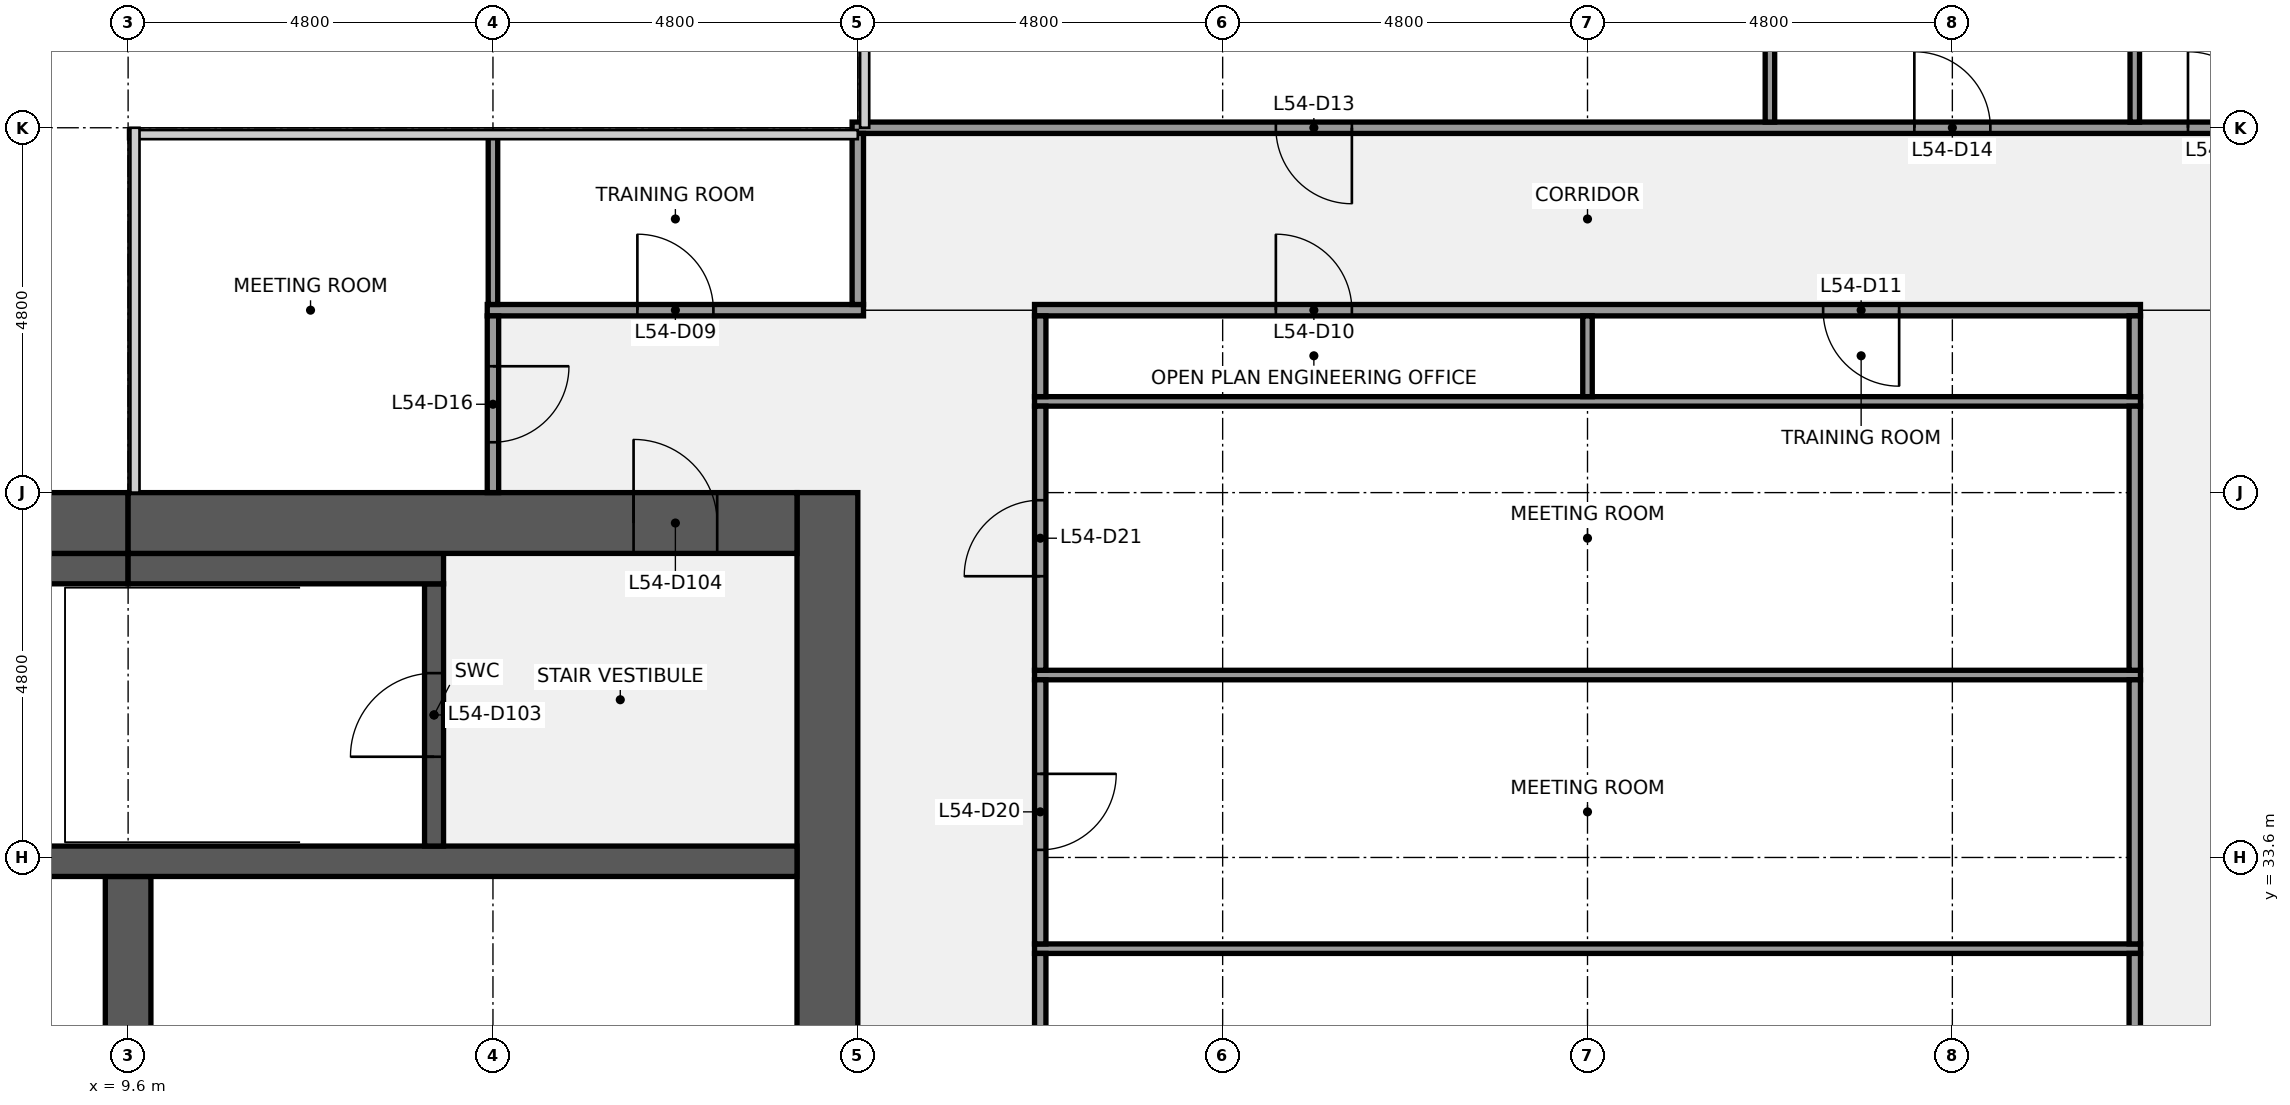
"""IFC4 building model, lengths in metres.
Left out: names, types, materials, properties, quantities, classifications, styles, units other than length and angle.
Written with IfcOpenShell. Run it as: python <this file> out.ifc"""

import sys

from ifc_helpers import new_model, si_unit, direction, frame, frame_2d, origin, place, context, subcontext, project, spatial, rectangle, extrude, element, fill, save


model = new_model("IFC4")
c1 = context("Model", 3, precision=1e-05, world=origin(), true_north=direction((0.0, 1.0)))
c2 = subcontext(c1, "Body", "Model", "MODEL_VIEW")
j1 = project(units=[si_unit("LENGTHUNIT", "METRE"), si_unit("PLANEANGLEUNIT", "RADIAN")], contexts=[c1])
p1 = place(None, origin())
s1 = spatial("IfcSite", under=j1, at=p1, CompositionType="ELEMENT")
p2 = place(p1, origin())
s2 = spatial("IfcBuilding", under=s1, at=p2, CompositionType="ELEMENT")
p3 = place(p2, frame((0.0, 0.0, 245.2)))
s3 = spatial("IfcBuildingStorey", under=s2, at=p3, CompositionType="ELEMENT", Elevation=245.2)
p4 = place(p3, frame((18.8, 38.4, 0.0), z_axis=(0.0, 0.0, 1.0), x_axis=(0.0, -1.0, 0.0)))
e1 = element("IfcWall", 1, at=p4, inside=s3, PredefinedType="SHEAR", context=c2, shape_type="SweptSolid", body=[
    extrude(rectangle(XDim=28.8, YDim=0.8, at=frame_2d((14.4, 0.0))), origin(), (0.0, 0.0, 1.0), 3.84),
])
p5 = place(p4, frame((18.3, 0.0, 0.0)))
e2 = element("IfcOpeningElement", 2, at=p5, cuts=e1, PredefinedType="OPENING", context=c2, shape_type="SweptSolid", body=[
    extrude(rectangle(XDim=1.8, YDim=2.1, at=frame_2d((0.9, 1.05))), frame((0.0, 0.41, 0.0), z_axis=(0.0, -1.0, 0.0), x_axis=(1.0, 0.0, 0.0)), (0.0, 0.0, 1.0), 0.82),
])
p6 = place(p4, frame((8.7, 0.0, 0.0)))
e3 = element("IfcOpeningElement", 3, at=p6, cuts=e1, PredefinedType="OPENING", context=c2, shape_type="SweptSolid", body=[
    extrude(rectangle(XDim=1.8, YDim=2.1, at=frame_2d((0.9, 1.05))), frame((0.0, 0.41, 0.0), z_axis=(0.0, -1.0, 0.0), x_axis=(1.0, 0.0, 0.0)), (0.0, 0.0, 1.0), 0.82),
])
p7 = place(p3, frame((9.6, 30.75, 0.0), z_axis=(0.0, 0.0, 1.0), x_axis=(0.0, 1.0, 0.0)))
e4 = element("IfcWall", 4, at=p7, inside=s3, PredefinedType="SHEAR", context=c2, shape_type="SweptSolid", body=[
    extrude(rectangle(XDim=2.6, YDim=0.6, at=frame_2d((1.3, 0.0))), origin(), (0.0, 0.0, 1.0), 3.84),
])
p8 = place(p3, frame((0.8, 33.55, 0.0), z_axis=(0.0, 0.0, 1.0), x_axis=(1.0, 0.0, 0.0)))
e5 = element("IfcWall", 5, at=p8, inside=s3, PredefinedType="SHEAR", context=c2, shape_type="SweptSolid", body=[
    extrude(rectangle(XDim=17.6, YDim=0.4, at=frame_2d((8.8, 0.0))), origin(), (0.0, 0.0, 1.0), 3.84),
])
p9 = place(p3, frame((13.625, 33.75, 0.0), z_axis=(0.0, 0.0, 1.0), x_axis=(0.0, 1.0, 0.0)))
e6 = element("IfcWall", 6, at=p9, inside=s3, PredefinedType="SHEAR", context=c2, shape_type="SweptSolid", body=[
    extrude(rectangle(XDim=3.45, YDim=0.25, at=frame_2d((1.725, 0.0))), origin(), (0.0, 0.0, 1.0), 3.84),
])
p10 = place(p9, frame((1.175, 0.0, 0.0)))
e7 = element("IfcOpeningElement", 7, at=p10, cuts=e6, PredefinedType="OPENING", context=c2, shape_type="SweptSolid", body=[
    extrude(rectangle(XDim=1.1, YDim=2.1, at=frame_2d((0.55, 1.05))), frame((0.0, 0.135, 0.0), z_axis=(0.0, -1.0, 0.0), x_axis=(1.0, 0.0, 0.0)), (0.0, 0.0, 1.0), 0.27),
])
p11 = place(p3, frame((6.25, 37.4, 0.0), z_axis=(0.0, 0.0, 1.0), x_axis=(1.0, 0.0, 0.0)))
e8 = element("IfcWall", 8, at=p11, inside=s3, PredefinedType="SHEAR", context=c2, shape_type="SweptSolid", body=[
    extrude(rectangle(XDim=3.35, YDim=0.4, at=frame_2d((1.675, 0.0))), origin(), (0.0, 0.0, 1.0), 3.84),
])
p12 = place(p3, frame((9.6, 37.4, 0.0), z_axis=(0.0, 0.0, 1.0), x_axis=(1.0, 0.0, 0.0)))
e9 = element("IfcWall", 9, at=p12, inside=s3, PredefinedType="SHEAR", context=c2, shape_type="SweptSolid", body=[
    extrude(rectangle(XDim=4.15, YDim=0.4, at=frame_2d((2.075, 0.0))), origin(), (0.0, 0.0, 1.0), 3.84),
])
p13 = place(p3, frame((0.8, 38.0, 0.0), z_axis=(0.0, 0.0, 1.0), x_axis=(1.0, 0.0, 0.0)))
e10 = element("IfcWall", 10, at=p13, inside=s3, PredefinedType="SHEAR", context=c2, shape_type="SweptSolid", body=[
    extrude(rectangle(XDim=8.8, YDim=0.8, at=frame_2d((4.4, 0.0))), origin(), (0.0, 0.0, 1.0), 3.84),
])
p14 = place(p13, frame((5.5, 0.0, 0.9)))
e11 = element("IfcOpeningElement", 11, at=p14, cuts=e10, PredefinedType="OPENING", context=c2, shape_type="SweptSolid", body=[
    extrude(rectangle(XDim=1.8, YDim=1.5, at=frame_2d((0.9, 0.75))), frame((0.0, 0.41, 0.0), z_axis=(0.0, -1.0, 0.0), x_axis=(1.0, 0.0, 0.0)), (0.0, 0.0, 1.0), 0.82),
])
p15 = place(p3, frame((9.6, 38.0, 0.0), z_axis=(0.0, 0.0, 1.0), x_axis=(1.0, 0.0, 0.0)))
e12 = element("IfcWall", 12, at=p15, inside=s3, PredefinedType="SHEAR", context=c2, shape_type="SweptSolid", body=[
    extrude(rectangle(XDim=8.8, YDim=0.8, at=frame_2d((4.4, 0.0))), origin(), (0.0, 0.0, 1.0), 3.84),
])
p16 = place(p15, frame((6.65, 0.0, 0.0)))
e13 = element("IfcOpeningElement", 13, at=p16, cuts=e12, PredefinedType="OPENING", context=c2, shape_type="SweptSolid", body=[
    extrude(rectangle(XDim=1.1, YDim=2.1, at=frame_2d((0.55, 1.05))), frame((0.0, 0.41, 0.0), z_axis=(0.0, -1.0, 0.0), x_axis=(1.0, 0.0, 0.0)), (0.0, 0.0, 1.0), 0.82),
])
for number, where, z_axis, x_axis in (
    (14, (21.525, 32.4, 0.0), (0.0, 0.0, 1.0), (1.0, 0.0, 0.0)),
    (15, (21.525, 36.0, 0.0), (0.0, 0.0, 1.0), (1.0, 0.0, 0.0)),
    (16, (21.525, 39.6, 0.0), (0.0, 0.0, 1.0), (1.0, 0.0, 0.0)),
):
    element("IfcWall", number, at=place(p3, frame(where, z_axis=z_axis, x_axis=x_axis)), inside=s3, PredefinedType="PARTITIONING", context=c2, shape_type="SweptSolid", body=[
        extrude(rectangle(XDim=14.55, YDim=0.125, at=frame_2d((7.275, 0.0))), origin(), (0.0, 0.0, 1.0), 2.87),
    ])
p17 = place(p3, frame((14.325, 40.8, 0.0), z_axis=(0.0, 0.0, 1.0), x_axis=(1.0, 0.0, 0.0)))
e17 = element("IfcWall", 17, at=p17, inside=s3, PredefinedType="PARTITIONING", context=c2, shape_type="SweptSolid", body=[
    extrude(rectangle(XDim=4.95, YDim=0.15, at=frame_2d((2.475, 0.0))), origin(), (0.0, 0.0, 1.0), 2.87),
])
p18 = place(p17, frame((1.975, 0.0, 0.0)))
e18 = element("IfcOpeningElement", 18, at=p18, cuts=e17, PredefinedType="OPENING", context=c2, shape_type="SweptSolid", body=[
    extrude(rectangle(XDim=1.0, YDim=2.1, at=frame_2d((0.5, 1.05))), frame((0.0, 0.085, 0.0), z_axis=(0.0, -1.0, 0.0), x_axis=(1.0, 0.0, 0.0)), (0.0, 0.0, 1.0), 0.17),
])
p19 = place(p3, frame((21.525, 40.8, 0.0), z_axis=(0.0, 0.0, 1.0), x_axis=(1.0, 0.0, 0.0)))
e19 = element("IfcWall", 19, at=p19, inside=s3, PredefinedType="PARTITIONING", context=c2, shape_type="SweptSolid", body=[
    extrude(rectangle(XDim=14.55, YDim=0.15, at=frame_2d((7.275, 0.0))), origin(), (0.0, 0.0, 1.0), 2.87),
])
p20 = place(p19, frame((3.175, 0.0, 0.0)))
e20 = element("IfcOpeningElement", 20, at=p20, cuts=e19, PredefinedType="OPENING", context=c2, shape_type="SweptSolid", body=[
    extrude(rectangle(XDim=1.0, YDim=2.1, at=frame_2d((0.5, 1.05))), frame((0.0, 0.085, 0.0), z_axis=(0.0, -1.0, 0.0), x_axis=(1.0, 0.0, 0.0)), (0.0, 0.0, 1.0), 0.17),
])
p21 = place(p19, frame((10.375, 0.0, 0.0)))
e21 = element("IfcOpeningElement", 21, at=p21, cuts=e19, PredefinedType="OPENING", context=c2, shape_type="SweptSolid", body=[
    extrude(rectangle(XDim=1.0, YDim=2.1, at=frame_2d((0.5, 1.05))), frame((0.0, 0.085, 0.0), z_axis=(0.0, -1.0, 0.0), x_axis=(1.0, 0.0, 0.0)), (0.0, 0.0, 1.0), 0.17),
])
p22 = place(p3, frame((19.125, 43.2, 0.0), z_axis=(0.0, 0.0, 1.0), x_axis=(1.0, 0.0, 0.0)))
e22 = element("IfcWall", 22, at=p22, inside=s3, PredefinedType="PARTITIONING", context=c2, shape_type="SweptSolid", body=[
    extrude(rectangle(XDim=19.35, YDim=0.15, at=frame_2d((9.675, 0.0))), origin(), (0.0, 0.0, 1.0), 2.87),
])
p23 = place(p22, frame((5.575, 0.0, 0.0)))
e23 = element("IfcOpeningElement", 23, at=p23, cuts=e22, PredefinedType="OPENING", context=c2, shape_type="SweptSolid", body=[
    extrude(rectangle(XDim=1.0, YDim=2.1, at=frame_2d((0.5, 1.05))), frame((0.0, 0.085, 0.0), z_axis=(0.0, -1.0, 0.0), x_axis=(1.0, 0.0, 0.0)), (0.0, 0.0, 1.0), 0.17),
])
p24 = place(p22, frame((13.975, 0.0, 0.0)))
e24 = element("IfcOpeningElement", 24, at=p24, cuts=e22, PredefinedType="OPENING", context=c2, shape_type="SweptSolid", body=[
    extrude(rectangle(XDim=1.0, YDim=2.1, at=frame_2d((0.5, 1.05))), frame((0.0, 0.085, 0.0), z_axis=(0.0, -1.0, 0.0), x_axis=(1.0, 0.0, 0.0)), (0.0, 0.0, 1.0), 0.17),
])
p25 = place(p22, frame((17.575, 0.0, 0.0)))
e25 = element("IfcOpeningElement", 25, at=p25, cuts=e22, PredefinedType="OPENING", context=c2, shape_type="SweptSolid", body=[
    extrude(rectangle(XDim=1.0, YDim=2.1, at=frame_2d((0.5, 1.05))), frame((0.0, 0.085, 0.0), z_axis=(0.0, -1.0, 0.0), x_axis=(1.0, 0.0, 0.0)), (0.0, 0.0, 1.0), 0.17),
])
p26 = place(p3, frame((14.4, 40.875, 0.0), z_axis=(0.0, 0.0, 1.0), x_axis=(0.0, 1.0, 0.0)))
e26 = element("IfcWall", 26, at=p26, inside=s3, PredefinedType="PARTITIONING", context=c2, shape_type="SweptSolid", body=[
    extrude(rectangle(XDim=2.225, YDim=0.125, at=frame_2d((1.113, 0.0))), origin(), (0.0, 0.0, 1.0), 2.87),
])
p27 = place(p3, frame((14.4, 38.4, 0.0), z_axis=(0.0, 0.0, 1.0), x_axis=(0.0, 1.0, 0.0)))
e27 = element("IfcWall", 27, at=p27, inside=s3, PredefinedType="PARTITIONING", context=c2, shape_type="SweptSolid", body=[
    extrude(rectangle(XDim=2.325, YDim=0.15, at=frame_2d((1.163, 0.0))), origin(), (0.0, 0.0, 1.0), 2.87),
])
p28 = place(p27, frame((0.663, 0.0, 0.0)))
e28 = element("IfcOpeningElement", 28, at=p28, cuts=e27, PredefinedType="OPENING", context=c2, shape_type="SweptSolid", body=[
    extrude(rectangle(XDim=1.0, YDim=2.1, at=frame_2d((0.5, 1.05))), frame((0.0, 0.085, 0.0), z_axis=(0.0, -1.0, 0.0), x_axis=(1.0, 0.0, 0.0)), (0.0, 0.0, 1.0), 0.17),
])
p29 = place(p3, frame((19.2, 40.875, 0.0), z_axis=(0.0, 0.0, 1.0), x_axis=(0.0, 1.0, 0.0)))
e29 = element("IfcWall", 29, at=p29, inside=s3, PredefinedType="PARTITIONING", context=c2, shape_type="SweptSolid", body=[
    extrude(rectangle(XDim=2.25, YDim=0.15, at=frame_2d((1.125, 0.0))), origin(), (0.0, 0.0, 1.0), 2.87),
])
p30 = place(p3, frame((21.6, 22.863, 0.0), z_axis=(0.0, 0.0, 1.0), x_axis=(0.0, 1.0, 0.0)))
e30 = element("IfcWall", 30, at=p30, inside=s3, PredefinedType="PARTITIONING", context=c2, shape_type="SweptSolid", body=[
    extrude(rectangle(XDim=9.475, YDim=0.15, at=frame_2d((4.737, 0.0))), origin(), (0.0, 0.0, 1.0), 2.87),
])
p31 = place(p30, frame((4.238, 0.0, 0.0)))
e31 = element("IfcOpeningElement", 31, at=p31, cuts=e30, PredefinedType="OPENING", context=c2, shape_type="SweptSolid", body=[
    extrude(rectangle(XDim=1.0, YDim=2.1, at=frame_2d((0.5, 1.05))), frame((0.0, 0.085, 0.0), z_axis=(0.0, -1.0, 0.0), x_axis=(1.0, 0.0, 0.0)), (0.0, 0.0, 1.0), 0.17),
])
p32 = place(p3, frame((21.6, 32.462, 0.0), z_axis=(0.0, 0.0, 1.0), x_axis=(0.0, 1.0, 0.0)))
e32 = element("IfcWall", 32, at=p32, inside=s3, PredefinedType="PARTITIONING", context=c2, shape_type="SweptSolid", body=[
    extrude(rectangle(XDim=3.475, YDim=0.15, at=frame_2d((1.738, 0.0))), origin(), (0.0, 0.0, 1.0), 2.87),
])
p33 = place(p32, frame((1.238, 0.0, 0.0)))
e33 = element("IfcOpeningElement", 33, at=p33, cuts=e32, PredefinedType="OPENING", context=c2, shape_type="SweptSolid", body=[
    extrude(rectangle(XDim=1.0, YDim=2.1, at=frame_2d((0.5, 1.05))), frame((0.0, 0.085, 0.0), z_axis=(0.0, -1.0, 0.0), x_axis=(1.0, 0.0, 0.0)), (0.0, 0.0, 1.0), 0.17),
])
p34 = place(p3, frame((21.6, 36.062, 0.0), z_axis=(0.0, 0.0, 1.0), x_axis=(0.0, 1.0, 0.0)))
e34 = element("IfcWall", 34, at=p34, inside=s3, PredefinedType="PARTITIONING", context=c2, shape_type="SweptSolid", body=[
    extrude(rectangle(XDim=3.475, YDim=0.15, at=frame_2d((1.738, 0.0))), origin(), (0.0, 0.0, 1.0), 2.87),
])
p35 = place(p34, frame((1.238, 0.0, 0.0)))
e35 = element("IfcOpeningElement", 35, at=p35, cuts=e34, PredefinedType="OPENING", context=c2, shape_type="SweptSolid", body=[
    extrude(rectangle(XDim=1.0, YDim=2.1, at=frame_2d((0.5, 1.05))), frame((0.0, 0.085, 0.0), z_axis=(0.0, -1.0, 0.0), x_axis=(1.0, 0.0, 0.0)), (0.0, 0.0, 1.0), 0.17),
])
p36 = place(p3, frame((21.6, 39.663, 0.0), z_axis=(0.0, 0.0, 1.0), x_axis=(0.0, 1.0, 0.0)))
e36 = element("IfcWall", 36, at=p36, inside=s3, PredefinedType="PARTITIONING", context=c2, shape_type="SweptSolid", body=[
    extrude(rectangle(XDim=1.062, YDim=0.15, at=frame_2d((0.531, 0.0))), origin(), (0.0, 0.0, 1.0), 2.87),
])
p37 = place(p3, frame((28.8, 39.663, 0.0), z_axis=(0.0, 0.0, 1.0), x_axis=(0.0, 1.0, 0.0)))
e37 = element("IfcWall", 37, at=p37, inside=s3, PredefinedType="PARTITIONING", context=c2, shape_type="SweptSolid", body=[
    extrude(rectangle(XDim=1.062, YDim=0.125, at=frame_2d((0.531, 0.0))), origin(), (0.0, 0.0, 1.0), 2.87),
])
for number, where, z_axis, x_axis in (
    (38, (31.2, 43.275, 0.0), (0.0, 0.0, 1.0), (0.0, 1.0, 0.0)),
    (39, (36.0, 43.275, 0.0), (0.0, 0.0, 1.0), (0.0, 1.0, 0.0)),
):
    element("IfcWall", number, at=place(p3, frame(where, z_axis=z_axis, x_axis=x_axis)), inside=s3, PredefinedType="PARTITIONING", context=c2, shape_type="SweptSolid", body=[
        extrude(rectangle(XDim=4.625, YDim=0.125, at=frame_2d((2.312, 0.0))), origin(), (0.0, 0.0, 1.0), 2.87),
    ])
p38 = place(p3, frame((36.0, 22.863, 0.0), z_axis=(0.0, 0.0, 1.0), x_axis=(0.0, 1.0, 0.0)))
e40 = element("IfcWall", 40, at=p38, inside=s3, PredefinedType="PARTITIONING", context=c2, shape_type="SweptSolid", body=[
    extrude(rectangle(XDim=9.475, YDim=0.15, at=frame_2d((4.737, 0.0))), origin(), (0.0, 0.0, 1.0), 2.87),
])
for number, where, z_axis, x_axis in (
    (41, (36.0, 32.462, 0.0), (0.0, 0.0, 1.0), (0.0, 1.0, 0.0)),
    (42, (36.0, 36.062, 0.0), (0.0, 0.0, 1.0), (0.0, 1.0, 0.0)),
):
    element("IfcWall", number, at=place(p3, frame(where, z_axis=z_axis, x_axis=x_axis)), inside=s3, PredefinedType="PARTITIONING", context=c2, shape_type="SweptSolid", body=[
        extrude(rectangle(XDim=3.475, YDim=0.15, at=frame_2d((1.738, 0.0))), origin(), (0.0, 0.0, 1.0), 2.87),
    ])
p39 = place(p3, frame((36.0, 39.663, 0.0), z_axis=(0.0, 0.0, 1.0), x_axis=(0.0, 1.0, 0.0)))
e43 = element("IfcWall", 43, at=p39, inside=s3, PredefinedType="PARTITIONING", context=c2, shape_type="SweptSolid", body=[
    extrude(rectangle(XDim=1.062, YDim=0.15, at=frame_2d((0.531, 0.0))), origin(), (0.0, 0.0, 1.0), 2.87),
])
p40 = place(p10, origin())
e44 = element("IfcDoor", 44, at=p40, inside=s3, OperationType="SINGLE_SWING_LEFT", PredefinedType="DOOR", context=c2, shape_type="SweptSolid", body=[
    extrude(rectangle(XDim=1.1, YDim=2.1, at=frame_2d((0.55, 1.05))), frame((0.0, 0.025, 0.0), z_axis=(0.0, -1.0, 0.0), x_axis=(1.0, 0.0, 0.0)), (0.0, 0.0, 1.0), 0.05),
])
fill(e7, e44)
p41 = place(p16, origin())
e45 = element("IfcDoor", 45, at=p41, inside=s3, OperationType="SINGLE_SWING_LEFT", PredefinedType="DOOR", context=c2, shape_type="SweptSolid", body=[
    extrude(rectangle(XDim=1.1, YDim=2.1, at=frame_2d((0.55, 1.05))), frame((0.0, 0.025, 0.0), z_axis=(0.0, -1.0, 0.0), x_axis=(1.0, 0.0, 0.0)), (0.0, 0.0, 1.0), 0.05),
])
fill(e13, e45)
p42 = place(p18, origin())
e46 = element("IfcDoor", 46, at=p42, inside=s3, OperationType="SINGLE_SWING_LEFT", PredefinedType="DOOR", context=c2, shape_type="SweptSolid", body=[
    extrude(rectangle(XDim=1.0, YDim=2.1, at=frame_2d((0.5, 1.05))), frame((0.0, 0.025, 0.0), z_axis=(0.0, -1.0, 0.0), x_axis=(1.0, 0.0, 0.0)), (0.0, 0.0, 1.0), 0.05),
])
fill(e18, e46)
p43 = place(p20, origin())
e47 = element("IfcDoor", 47, at=p43, inside=s3, OperationType="SINGLE_SWING_LEFT", PredefinedType="DOOR", context=c2, shape_type="SweptSolid", body=[
    extrude(rectangle(XDim=1.0, YDim=2.1, at=frame_2d((0.5, 1.05))), frame((0.0, 0.025, 0.0), z_axis=(0.0, -1.0, 0.0), x_axis=(1.0, 0.0, 0.0)), (0.0, 0.0, 1.0), 0.05),
])
fill(e20, e47)
p44 = place(p21, origin())
e48 = element("IfcDoor", 48, at=p44, inside=s3, OperationType="SINGLE_SWING_RIGHT", PredefinedType="DOOR", context=c2, shape_type="SweptSolid", body=[
    extrude(rectangle(XDim=1.0, YDim=2.1, at=frame_2d((0.5, 1.05))), frame((0.0, 0.025, 0.0), z_axis=(0.0, -1.0, 0.0), x_axis=(1.0, 0.0, 0.0)), (0.0, 0.0, 1.0), 0.05),
])
fill(e21, e48)
p45 = place(p23, origin())
e49 = element("IfcDoor", 49, at=p45, inside=s3, OperationType="SINGLE_SWING_RIGHT", PredefinedType="DOOR", context=c2, shape_type="SweptSolid", body=[
    extrude(rectangle(XDim=1.0, YDim=2.1, at=frame_2d((0.5, 1.05))), frame((0.0, 0.025, 0.0), z_axis=(0.0, -1.0, 0.0), x_axis=(1.0, 0.0, 0.0)), (0.0, 0.0, 1.0), 0.05),
])
fill(e23, e49)
p46 = place(p24, origin())
e50 = element("IfcDoor", 50, at=p46, inside=s3, OperationType="SINGLE_SWING_LEFT", PredefinedType="DOOR", context=c2, shape_type="SweptSolid", body=[
    extrude(rectangle(XDim=1.0, YDim=2.1, at=frame_2d((0.5, 1.05))), frame((0.0, 0.025, 0.0), z_axis=(0.0, -1.0, 0.0), x_axis=(1.0, 0.0, 0.0)), (0.0, 0.0, 1.0), 0.05),
])
fill(e24, e50)
p47 = place(p25, origin())
e51 = element("IfcDoor", 51, at=p47, inside=s3, OperationType="SINGLE_SWING_LEFT", PredefinedType="DOOR", context=c2, shape_type="SweptSolid", body=[
    extrude(rectangle(XDim=1.0, YDim=2.1, at=frame_2d((0.5, 1.05))), frame((0.0, 0.025, 0.0), z_axis=(0.0, -1.0, 0.0), x_axis=(1.0, 0.0, 0.0)), (0.0, 0.0, 1.0), 0.05),
])
fill(e25, e51)
p48 = place(p28, origin())
e52 = element("IfcDoor", 52, at=p48, inside=s3, OperationType="SINGLE_SWING_RIGHT", PredefinedType="DOOR", context=c2, shape_type="SweptSolid", body=[
    extrude(rectangle(XDim=1.0, YDim=2.1, at=frame_2d((0.5, 1.05))), frame((0.0, 0.025, 0.0), z_axis=(0.0, -1.0, 0.0), x_axis=(1.0, 0.0, 0.0)), (0.0, 0.0, 1.0), 0.05),
])
fill(e28, e52)
p49 = place(p33, origin())
e53 = element("IfcDoor", 53, at=p49, inside=s3, OperationType="SINGLE_SWING_RIGHT", PredefinedType="DOOR", context=c2, shape_type="SweptSolid", body=[
    extrude(rectangle(XDim=1.0, YDim=2.1, at=frame_2d((0.5, 1.05))), frame((0.0, 0.025, 0.0), z_axis=(0.0, -1.0, 0.0), x_axis=(1.0, 0.0, 0.0)), (0.0, 0.0, 1.0), 0.05),
])
fill(e33, e53)
p50 = place(p35, origin())
e54 = element("IfcDoor", 54, at=p50, inside=s3, OperationType="SINGLE_SWING_LEFT", PredefinedType="DOOR", context=c2, shape_type="SweptSolid", body=[
    extrude(rectangle(XDim=1.0, YDim=2.1, at=frame_2d((0.5, 1.05))), frame((0.0, 0.025, 0.0), z_axis=(0.0, -1.0, 0.0), x_axis=(1.0, 0.0, 0.0)), (0.0, 0.0, 1.0), 0.05),
])
fill(e35, e54)
save(model, sys.argv[1])
